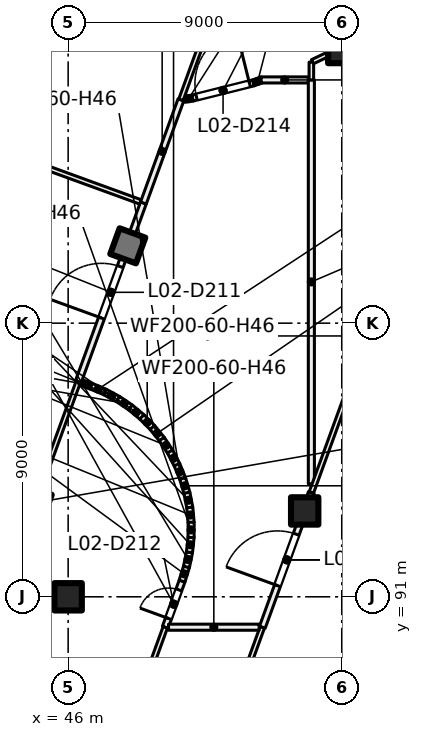
"""IFC4 building model, lengths in metres.
Left out: names, types, materials, properties, quantities, classifications, styles, units other than length and angle.
Written with IfcOpenShell. Run it as: python <this file> out.ifc"""

import sys

from ifc_helpers import new_model, si_unit, direction, frame, frame_2d, origin, origin_2d, place, context, subcontext, project, spatial, rectangle, extrude, element, fill, save


model = new_model("IFC4")
c1 = context("Model", 3, precision=1e-05, world=origin(), true_north=direction((0.0, 1.0)))
c2 = subcontext(c1, "Body", "Model", "MODEL_VIEW")
j1 = project(units=[si_unit("LENGTHUNIT", "METRE"), si_unit("PLANEANGLEUNIT", "RADIAN")], contexts=[c1])
p1 = place(None, origin())
s1 = spatial("IfcSite", under=j1, at=p1, CompositionType="ELEMENT")
p2 = place(p1, origin())
s2 = spatial("IfcBuilding", under=s1, at=p2, CompositionType="ELEMENT")
p3 = place(p2, frame((0.0, 0.0, 12.5)))
s3 = spatial("IfcBuildingStorey", under=s2, at=p3, CompositionType="ELEMENT", Elevation=12.5)
for number, where, z_axis, x_axis in (
    (1, (46.0, 91.0, 0.0), (0.0, 0.0, 1.0), (1.0, 0.0, 0.0)),
    (2, (55.0, 109.0, 0.0), (0.0, 0.0, 1.0), (1.0, 0.0, 0.0)),
    (3, (53.78, 93.824, 0.0), (0.0, 0.0, 1.0), (1.0, 0.0, 0.0)),
    (4, (47.962, 102.544, 0.0), (0.0, 0.0, 1.0), (-0.342, -0.94, 0.0)),
):
    element("IfcColumn", number, at=place(p3, frame(where, z_axis=z_axis, x_axis=x_axis)), inside=s3, PredefinedType="COLUMN", context=c2, shape_type="SweptSolid", body=[
        extrude(rectangle(XDim=0.9, YDim=0.9, at=origin_2d()), origin(), (0.0, 0.0, 1.0), 5.0),
    ])
p4 = place(p3, frame((91.159, 89.742, 0.0), z_axis=(0.0, 0.0, 1.0), x_axis=(-0.866704063601, -0.498822680055, 0.0)))
e5 = element("IfcWall", 5, at=p4, inside=s3, PredefinedType="SOLIDWALL", context=c2, shape_type="SweptSolid", body=[
    extrude(rectangle(XDim=44.487, YDim=0.6, at=frame_2d((22.244, 0.0))), origin(), (0.0, 0.0, 1.0), 4.6),
])
p5 = place(p4, frame((5.173, 0.0, 0.9)))
e6 = element("IfcOpeningElement", 6, at=p5, cuts=e5, PredefinedType="OPENING", context=c2, shape_type="SweptSolid", body=[
    extrude(rectangle(XDim=3.0, YDim=3.0, at=frame_2d((1.5, 1.5))), frame((0.0, 0.31, 0.0), z_axis=(0.0, -1.0, 0.0), x_axis=(1.0, 0.0, 0.0)), (0.0, 0.0, 1.0), 0.62),
])
p6 = place(p4, frame((14.071, 0.0, 0.9)))
e7 = element("IfcOpeningElement", 7, at=p6, cuts=e5, PredefinedType="OPENING", context=c2, shape_type="SweptSolid", body=[
    extrude(rectangle(XDim=3.0, YDim=3.0, at=frame_2d((1.5, 1.5))), frame((0.0, 0.31, 0.0), z_axis=(0.0, -1.0, 0.0), x_axis=(1.0, 0.0, 0.0)), (0.0, 0.0, 1.0), 0.62),
])
p7 = place(p4, frame((22.968, 0.0, 0.9)))
e8 = element("IfcOpeningElement", 8, at=p7, cuts=e5, PredefinedType="OPENING", context=c2, shape_type="SweptSolid", body=[
    extrude(rectangle(XDim=3.0, YDim=3.0, at=frame_2d((1.5, 1.5))), frame((0.0, 0.31, 0.0), z_axis=(0.0, -1.0, 0.0), x_axis=(1.0, 0.0, 0.0)), (0.0, 0.0, 1.0), 0.62),
])
p8 = place(p4, frame((31.865, 0.0, 0.9)))
e9 = element("IfcOpeningElement", 9, at=p8, cuts=e5, PredefinedType="OPENING", context=c2, shape_type="SweptSolid", body=[
    extrude(rectangle(XDim=3.0, YDim=3.0, at=frame_2d((1.5, 1.5))), frame((0.0, 0.31, 0.0), z_axis=(0.0, -1.0, 0.0), x_axis=(1.0, 0.0, 0.0)), (0.0, 0.0, 1.0), 0.62),
])
p9 = place(p4, frame((40.613, 0.0, 0.9)))
e10 = element("IfcOpeningElement", 10, at=p9, cuts=e5, PredefinedType="OPENING", context=c2, shape_type="SweptSolid", body=[
    extrude(rectangle(XDim=3.0, YDim=3.0, at=frame_2d((1.5, 1.5))), frame((0.0, 0.31, 0.0), z_axis=(0.0, -1.0, 0.0), x_axis=(1.0, 0.0, 0.0)), (0.0, 0.0, 1.0), 0.62),
])
p10 = place(p3, frame((40.44, 106.878, 0.0), z_axis=(0.0, 0.0, 1.0), x_axis=(0.939672748075, -0.342074738216, 0.0)))
e11 = element("IfcWall", 11, at=p10, inside=s3, PredefinedType="PARTITIONING", context=c2, shape_type="SweptSolid", body=[
    extrude(rectangle(XDim=8.451, YDim=0.15, at=frame_2d((4.226, 0.0))), origin(), (0.0, 0.0, 1.0), 4.6),
])
p11 = place(p3, frame((49.196, 90.0, 0.0), z_axis=(0.0, 0.0, 1.0), x_axis=(-0.342037332118, -0.939686364399, 0.0)))
e12 = element("IfcWall", 12, at=p11, inside=s3, PredefinedType="PARTITIONING", context=c2, shape_type="SweptSolid", body=[
    extrude(rectangle(XDim=15.387, YDim=0.15, at=frame_2d((7.693, 0.0))), origin(), (0.0, 0.0, 1.0), 4.6),
])
p12 = place(p11, frame((6.99, 0.0, 0.0)))
e13 = element("IfcOpeningElement", 13, at=p12, cuts=e12, PredefinedType="OPENING", context=c2, shape_type="SweptSolid", body=[
    extrude(rectangle(XDim=1.0, YDim=2.1, at=frame_2d((0.5, 1.05))), frame((0.0, 0.085, 0.0), z_axis=(0.0, -1.0, 0.0), x_axis=(1.0, 0.0, 0.0)), (0.0, 0.0, 1.0), 0.17),
])
p13 = place(p3, frame((44.627, 93.382, 0.0), z_axis=(0.0, 0.0, 1.0), x_axis=(0.342025351501, 0.939690725149, 0.0)))
e14 = element("IfcWall", 14, at=p13, inside=s3, PredefinedType="PARTITIONING", context=c2, shape_type="SweptSolid", body=[
    extrude(rectangle(XDim=5.0, YDim=0.15, at=frame_2d((2.5, 0.0))), origin(), (0.0, 0.0, 1.0), 4.6),
])
p14 = place(p3, frame((46.431, 98.046, 0.0), z_axis=(0.0, 0.0, 1.0), x_axis=(0.939367946247, -0.342910865334, 0.0)))
e15 = element("IfcWall", 15, at=p14, inside=s3, PredefinedType="PARTITIONING", context=c2, shape_type="SweptSolid", body=[
    extrude(rectangle(XDim=0.353, YDim=0.2, at=frame_2d((0.176, 0.0))), origin(), (0.0, 0.0, 1.0), 4.6),
])
p15 = place(p3, frame((46.337, 98.08, 0.0), z_axis=(0.0, 0.0, 1.0), x_axis=(0.342113136459, 0.939658768842, 0.0)))
e16 = element("IfcWall", 16, at=p15, inside=s3, PredefinedType="PARTITIONING", context=c2, shape_type="SweptSolid", body=[
    extrude(rectangle(XDim=6.25, YDim=0.2, at=frame_2d((3.125, 0.0))), origin(), (0.0, 0.0, 1.0), 4.6),
])
p16 = place(p15, frame((2.223, 0.0, 0.0)))
e17 = element("IfcOpeningElement", 17, at=p16, cuts=e16, PredefinedType="OPENING", context=c2, shape_type="SweptSolid", body=[
    extrude(rectangle(XDim=1.8, YDim=2.1, at=frame_2d((0.9, 1.05))), frame((0.0, 0.11, 0.0), z_axis=(0.0, -1.0, 0.0), x_axis=(1.0, 0.0, 0.0)), (0.0, 0.0, 1.0), 0.22),
])
p17 = place(p3, frame((46.758, 97.927, 0.0), z_axis=(0.0, 0.0, 1.0), x_axis=(0.921736861553, -0.387815881643, 0.0)))
e18 = element("IfcWall", 18, at=p17, inside=s3, PredefinedType="PARTITIONING", context=c2, shape_type="SweptSolid", body=[
    extrude(rectangle(XDim=0.498, YDim=0.2, at=frame_2d((0.249, 0.0))), origin(), (0.0, 0.0, 1.0), 4.6),
])
p18 = place(p3, frame((47.208, 97.738, 0.0), z_axis=(0.0, 0.0, 1.0), x_axis=(0.879513307417, -0.475874292304, 0.0)))
e19 = element("IfcWall", 19, at=p18, inside=s3, PredefinedType="PARTITIONING", context=c2, shape_type="SweptSolid", body=[
    extrude(rectangle(XDim=0.5, YDim=0.2, at=frame_2d((0.25, 0.0))), origin(), (0.0, 0.0, 1.0), 4.6),
])
p19 = place(p3, frame((47.608, 76.866, 0.0), z_axis=(0.0, 0.0, 1.0), x_axis=(0.341996903655, 0.939701079009, 0.0)))
e20 = element("IfcWall", 20, at=p19, inside=s3, PredefinedType="PARTITIONING", context=c2, shape_type="SweptSolid", body=[
    extrude(rectangle(XDim=13.977, YDim=0.15, at=frame_2d((6.988, 0.0))), origin(), (0.0, 0.0, 1.0), 4.6),
])
p20 = place(p3, frame((47.64, 97.505, 0.0), z_axis=(0.0, 0.0, 1.0), x_axis=(0.828576718052, -0.559875541797, 0.0)))
e21 = element("IfcWall", 21, at=p20, inside=s3, PredefinedType="PARTITIONING", context=c2, shape_type="SweptSolid", body=[
    extrude(rectangle(XDim=0.5, YDim=0.2, at=frame_2d((0.25, 0.0))), origin(), (0.0, 0.0, 1.0), 4.6),
])
p21 = place(p3, frame((48.046, 97.231, 0.0), z_axis=(0.0, 0.0, 1.0), x_axis=(0.769775465544, -0.638314759853, 0.0)))
e22 = element("IfcWall", 22, at=p21, inside=s3, PredefinedType="PARTITIONING", context=c2, shape_type="SweptSolid", body=[
    extrude(rectangle(XDim=0.501, YDim=0.2, at=frame_2d((0.251, 0.0))), origin(), (0.0, 0.0, 1.0), 4.6),
])
p22 = place(p3, frame((48.425, 96.917, 0.0), z_axis=(0.0, 0.0, 1.0), x_axis=(0.702936615275, -0.711252497293, 0.0)))
e23 = element("IfcWall", 23, at=p22, inside=s3, PredefinedType="PARTITIONING", context=c2, shape_type="SweptSolid", body=[
    extrude(rectangle(XDim=0.499, YDim=0.2, at=frame_2d((0.25, 0.0))), origin(), (0.0, 0.0, 1.0), 4.6),
])
p23 = place(p3, frame((48.475, 103.953, 0.0), z_axis=(0.0, 0.0, 1.0), x_axis=(0.341992779494, 0.939702579955, 0.0)))
e24 = element("IfcWall", 24, at=p23, inside=s3, PredefinedType="PARTITIONING", context=c2, shape_type="SweptSolid", body=[
    extrude(rectangle(XDim=3.611, YDim=0.2, at=frame_2d((1.805, 0.0))), origin(), (0.0, 0.0, 1.0), 4.6),
])
p24 = place(p3, frame((48.77, 96.569, 0.0), z_axis=(0.0, 0.0, 1.0), x_axis=(0.629085992687, -0.777335714994, 0.0)))
e25 = element("IfcWall", 25, at=p24, inside=s3, PredefinedType="PARTITIONING", context=c2, shape_type="SweptSolid", body=[
    extrude(rectangle(XDim=0.501, YDim=0.2, at=frame_2d((0.25, 0.0))), origin(), (0.0, 0.0, 1.0), 4.6),
])
p25 = place(p3, frame((49.079, 96.188, 0.0), z_axis=(0.0, 0.0, 1.0), x_axis=(0.553123351367, -0.833099368726, 0.0)))
e26 = element("IfcWall", 26, at=p25, inside=s3, PredefinedType="PARTITIONING", context=c2, shape_type="SweptSolid", body=[
    extrude(rectangle(XDim=0.5, YDim=0.2, at=frame_2d((0.25, 0.0))), origin(), (0.0, 0.0, 1.0), 4.6),
])
p26 = place(p3, frame((49.196, 90.0, 0.0), z_axis=(0.0, 0.0, 1.0), x_axis=(0.341876370555, 0.93974493734, 0.0)))
e27 = element("IfcWall", 27, at=p26, inside=s3, PredefinedType="PARTITIONING", context=c2, shape_type="SweptSolid", body=[
    extrude(rectangle(XDim=1.617, YDim=0.2, at=frame_2d((0.809, 0.0))), origin(), (0.0, 0.0, 1.0), 4.6),
])
p27 = place(p26, frame((0.306, 0.0, 0.0)))
e28 = element("IfcOpeningElement", 28, at=p27, cuts=e27, PredefinedType="OPENING", context=c2, shape_type="SweptSolid", body=[
    extrude(rectangle(XDim=1.0, YDim=2.1, at=frame_2d((0.5, 1.05))), frame((0.0, 0.11, 0.0), z_axis=(0.0, -1.0, 0.0), x_axis=(1.0, 0.0, 0.0)), (0.0, 0.0, 1.0), 0.22),
])
p28 = place(p3, frame((49.302, 90.0, 0.0), z_axis=(0.0, 0.0, 1.0), x_axis=(1.0, 0.0, 0.0)))
e29 = element("IfcWall", 29, at=p28, inside=s3, PredefinedType="PARTITIONING", context=c2, shape_type="SweptSolid", body=[
    extrude(rectangle(XDim=2.98, YDim=0.2, at=frame_2d((1.49, 0.0))), origin(), (0.0, 0.0, 1.0), 4.6),
])
p29 = place(p3, frame((49.351, 95.779, 0.0), z_axis=(0.0, 0.0, 1.0), x_axis=(0.464536791609, -0.885553820635, 0.0)))
e30 = element("IfcWall", 30, at=p29, inside=s3, PredefinedType="PARTITIONING", context=c2, shape_type="SweptSolid", body=[
    extrude(rectangle(XDim=0.499, YDim=0.2, at=frame_2d((0.25, 0.0))), origin(), (0.0, 0.0, 1.0), 4.6),
])
p30 = place(p3, frame((49.579, 95.345, 0.0), z_axis=(0.0, 0.0, 1.0), x_axis=(0.379620609111, -0.925142255622, 0.0)))
e31 = element("IfcWall", 31, at=p30, inside=s3, PredefinedType="PARTITIONING", context=c2, shape_type="SweptSolid", body=[
    extrude(rectangle(XDim=0.5, YDim=0.2, at=frame_2d((0.25, 0.0))), origin(), (0.0, 0.0, 1.0), 4.6),
])
p31 = place(p3, frame((49.823, 107.363, 0.0), z_axis=(0.0, 0.0, 1.0), x_axis=(0.988866439098, 0.148805798359, 0.0)))
e32 = element("IfcWall", 32, at=p31, inside=s3, PredefinedType="PARTITIONING", context=c2, shape_type="SweptSolid", body=[
    extrude(rectangle(XDim=0.282, YDim=0.2, at=frame_2d((0.141, 0.0))), origin(), (0.0, 0.0, 1.0), 4.6),
])
p32 = place(p3, frame((49.71, 107.346, 0.0), z_axis=(0.0, 0.0, 1.0), x_axis=(0.341943087223, 0.939720663336, 0.0)))
e33 = element("IfcWall", 33, at=p32, inside=s3, PredefinedType="PARTITIONING", context=c2, shape_type="SweptSolid", body=[
    extrude(rectangle(XDim=5.39, YDim=0.15, at=frame_2d((2.695, 0.0))), origin(), (0.0, 0.0, 1.0), 4.6),
])
p33 = place(p3, frame((49.747, 91.516, 0.0), z_axis=(0.0, 0.0, 1.0), x_axis=(0.29511913713, 0.955460462238, 0.0)))
e34 = element("IfcWall", 34, at=p33, inside=s3, PredefinedType="PARTITIONING", context=c2, shape_type="SweptSolid", body=[
    extrude(rectangle(XDim=0.498, YDim=0.2, at=frame_2d((0.249, 0.0))), origin(), (0.0, 0.0, 1.0), 4.6),
])
p34 = place(p3, frame((49.766, 94.892, 0.0), z_axis=(0.0, 0.0, 1.0), x_axis=(0.282745917583, -0.95919484261, 0.0)))
e35 = element("IfcWall", 35, at=p34, inside=s3, PredefinedType="PARTITIONING", context=c2, shape_type="SweptSolid", body=[
    extrude(rectangle(XDim=0.502, YDim=0.2, at=frame_2d((0.251, 0.0))), origin(), (0.0, 0.0, 1.0), 4.6),
])
p35 = place(p3, frame((49.892, 91.982, 0.0), z_axis=(0.0, 0.0, 1.0), x_axis=(0.20155652864, 0.979476883731, 0.0)))
e36 = element("IfcWall", 36, at=p35, inside=s3, PredefinedType="PARTITIONING", context=c2, shape_type="SweptSolid", body=[
    extrude(rectangle(XDim=0.5, YDim=0.2, at=frame_2d((0.25, 0.0))), origin(), (0.0, 0.0, 1.0), 4.6),
])
p36 = place(p3, frame((49.906, 94.421, 0.0), z_axis=(0.0, 0.0, 1.0), x_axis=(0.189915644008, -0.981800411571, 0.0)))
e37 = element("IfcWall", 37, at=p36, inside=s3, PredefinedType="PARTITIONING", context=c2, shape_type="SweptSolid", body=[
    extrude(rectangle(XDim=0.5, YDim=0.2, at=frame_2d((0.25, 0.0))), origin(), (0.0, 0.0, 1.0), 4.6),
])
for number, where, z_axis, x_axis in (
    (38, (49.991, 92.462, 0.0), (0.0, 0.0, 1.0), (0.106, 0.994, 0.0)),
    (39, (50.0, 93.94, 0.0), (0.0, 0.0, 1.0), (0.09, -0.996, 0.0)),
    (40, (50.043, 92.95, 0.0), (0.0, 0.0, 1.0), (0.004, 1.0, 0.0)),
):
    element("IfcWall", number, at=place(p3, frame(where, z_axis=z_axis, x_axis=x_axis)), inside=s3, PredefinedType="PARTITIONING", context=c2, shape_type="SweptSolid", body=[
        extrude(rectangle(XDim=0.501, YDim=0.2, at=frame_2d((0.25, 0.0))), origin(), (0.0, 0.0, 1.0), 4.6),
    ])
p37 = place(p3, frame((52.101, 107.905, 0.0), z_axis=(0.0, 0.0, 1.0), x_axis=(-0.970177165917, -0.242396919811, 0.0)))
e41 = element("IfcWall", 41, at=p37, inside=s3, PredefinedType="PARTITIONING", context=c2, shape_type="SweptSolid", body=[
    extrude(rectangle(XDim=2.071, YDim=0.2, at=frame_2d((1.035, 0.0))), origin(), (0.0, 0.0, 1.0), 4.6),
])
p38 = place(p37, frame((0.136, 0.0, 0.0)))
e42 = element("IfcOpeningElement", 42, at=p38, cuts=e41, PredefinedType="OPENING", context=c2, shape_type="SweptSolid", body=[
    extrude(rectangle(XDim=1.8, YDim=2.1, at=frame_2d((0.9, 1.05))), frame((0.0, 0.11, 0.0), z_axis=(0.0, -1.0, 0.0), x_axis=(1.0, 0.0, 0.0)), (0.0, 0.0, 1.0), 0.22),
])
p39 = place(p3, frame((52.091, 107.902, 0.0), z_axis=(0.0, 0.0, 1.0), x_axis=(0.940856992367, 0.338803954986, 0.0)))
e43 = element("IfcWall", 43, at=p39, inside=s3, PredefinedType="PARTITIONING", context=c2, shape_type="SweptSolid", body=[
    extrude(rectangle(XDim=0.307, YDim=0.2, at=frame_2d((0.153, 0.0))), origin(), (0.0, 0.0, 1.0), 4.6),
])
p40 = place(p3, frame((52.347, 108.0, 0.0), z_axis=(0.0, 0.0, 1.0), x_axis=(1.0, 0.0, 0.0)))
e44 = element("IfcWall", 44, at=p40, inside=s3, PredefinedType="PARTITIONING", context=c2, shape_type="SweptSolid", body=[
    extrude(rectangle(XDim=1.553, YDim=0.2, at=frame_2d((0.776, 0.0))), origin(), (0.0, 0.0, 1.0), 4.6),
])
p41 = place(p3, frame((52.388, 90.0, 0.0), z_axis=(0.0, 0.0, 1.0), x_axis=(0.342096627731, 0.939664779214, 0.0)))
e45 = element("IfcWall", 45, at=p41, inside=s3, PredefinedType="PARTITIONING", context=c2, shape_type="SweptSolid", body=[
    extrude(rectangle(XDim=4.712, YDim=0.2, at=frame_2d((2.356, 0.0))), origin(), (0.0, 0.0, 1.0), 4.6),
])
p42 = place(p41, frame((1.456, 0.0, 0.0)))
e46 = element("IfcOpeningElement", 46, at=p42, cuts=e45, PredefinedType="OPENING", context=c2, shape_type="SweptSolid", body=[
    extrude(rectangle(XDim=1.8, YDim=2.1, at=frame_2d((0.9, 1.05))), frame((0.0, 0.11, 0.0), z_axis=(0.0, -1.0, 0.0), x_axis=(1.0, 0.0, 0.0)), (0.0, 0.0, 1.0), 0.22),
])
p43 = place(p3, frame((53.348, 75.152, 0.0), z_axis=(0.0, 0.0, 1.0), x_axis=(0.342006895874, 0.939697442358, 0.0)))
e47 = element("IfcWall", 47, at=p43, inside=s3, PredefinedType="PARTITIONING", context=c2, shape_type="SweptSolid", body=[
    extrude(rectangle(XDim=29.792, YDim=0.3, at=frame_2d((14.896, 0.0))), origin(), (0.0, 0.0, 1.0), 6.1),
])
p44 = place(p3, frame((101.764, 103.0, 0.0), z_axis=(0.0, 0.0, 1.0), x_axis=(-0.866697259032, -0.498834502802, 0.0)))
e48 = element("IfcWall", 48, at=p44, inside=s3, PredefinedType="PARTITIONING", context=c2, shape_type="SweptSolid", body=[
    extrude(rectangle(XDim=55.547, YDim=0.3, at=frame_2d((27.774, 0.0))), origin(), (0.0, 0.0, 1.0), 6.1),
])
p45 = place(p44, frame((43.673, 0.0, 0.0)))
e49 = element("IfcOpeningElement", 49, at=p45, cuts=e48, PredefinedType="OPENING", context=c2, shape_type="SweptSolid", body=[
    extrude(rectangle(XDim=2.0, YDim=2.1, at=frame_2d((1.0, 1.05))), frame((0.0, 0.16, 0.0), z_axis=(0.0, -1.0, 0.0), x_axis=(1.0, 0.0, 0.0)), (0.0, 0.0, 1.0), 0.32),
])
p46 = place(p44, frame((26.921, 0.0, 0.0)))
e50 = element("IfcOpeningElement", 50, at=p46, cuts=e48, PredefinedType="OPENING", context=c2, shape_type="SweptSolid", body=[
    extrude(rectangle(XDim=2.0, YDim=2.1, at=frame_2d((1.0, 1.05))), frame((0.0, 0.16, 0.0), z_axis=(0.0, -1.0, 0.0), x_axis=(1.0, 0.0, 0.0)), (0.0, 0.0, 1.0), 0.32),
])
p47 = place(p44, frame((10.169, 0.0, 0.0)))
e51 = element("IfcOpeningElement", 51, at=p47, cuts=e48, PredefinedType="OPENING", context=c2, shape_type="SweptSolid", body=[
    extrude(rectangle(XDim=2.0, YDim=2.1, at=frame_2d((1.0, 1.05))), frame((0.0, 0.16, 0.0), z_axis=(0.0, -1.0, 0.0), x_axis=(1.0, 0.0, 0.0)), (0.0, 0.0, 1.0), 0.32),
])
p48 = place(p3, frame((54.0, 94.715, 0.0), z_axis=(0.0, 0.0, 1.0), x_axis=(0.0, 1.0, 0.0)))
e52 = element("IfcWall", 52, at=p48, inside=s3, PredefinedType="PARTITIONING", context=c2, shape_type="SweptSolid", body=[
    extrude(rectangle(XDim=13.285, YDim=0.2, at=frame_2d((6.643, 0.0))), origin(), (0.0, 0.0, 1.0), 4.6),
])
p49 = place(p3, frame((54.0, 94.429, 0.0), z_axis=(0.0, 0.0, 1.0), x_axis=(0.342085241875, 0.939668924298, 0.0)))
e53 = element("IfcWall", 53, at=p49, inside=s3, PredefinedType="PARTITIONING", context=c2, shape_type="SweptSolid", body=[
    extrude(rectangle(XDim=15.581, YDim=0.15, at=frame_2d((7.791, 0.0))), origin(), (0.0, 0.0, 1.0), 4.6),
])
p50 = place(p3, frame((54.0, 108.0, 0.0), z_axis=(0.0, 0.0, 1.0), x_axis=(0.0, 1.0, 0.0)))
e54 = element("IfcWall", 54, at=p50, inside=s3, PredefinedType="PARTITIONING", context=c2, shape_type="SweptSolid", body=[
    extrude(rectangle(XDim=0.586, YDim=0.15, at=frame_2d((0.293, 0.0))), origin(), (0.0, 0.0, 1.0), 4.6),
])
p51 = place(p3, frame((54.036, 108.599, 0.0), z_axis=(0.0, 0.0, 1.0), x_axis=(0.903959249768, 0.427618608995, 0.0)))
e55 = element("IfcWall", 55, at=p51, inside=s3, PredefinedType="PARTITIONING", context=c2, shape_type="SweptSolid", body=[
    extrude(rectangle(XDim=2.064, YDim=0.15, at=frame_2d((1.032, 0.0))), origin(), (0.0, 0.0, 1.0), 4.6),
])
p52 = place(p16, origin())
e56 = element("IfcDoor", 56, at=p52, inside=s3, OperationType="DOUBLE_DOOR_SINGLE_SWING", PredefinedType="DOOR", context=c2, shape_type="SweptSolid", body=[
    extrude(rectangle(XDim=1.8, YDim=2.1, at=frame_2d((0.9, 1.05))), frame((0.0, 0.025, 0.0), z_axis=(0.0, -1.0, 0.0), x_axis=(1.0, 0.0, 0.0)), (0.0, 0.0, 1.0), 0.05),
])
fill(e17, e56)
p53 = place(p27, origin())
e57 = element("IfcDoor", 57, at=p53, inside=s3, OperationType="SINGLE_SWING_LEFT", PredefinedType="DOOR", context=c2, shape_type="SweptSolid", body=[
    extrude(rectangle(XDim=1.0, YDim=2.1, at=frame_2d((0.5, 1.05))), frame((0.0, 0.025, 0.0), z_axis=(0.0, -1.0, 0.0), x_axis=(1.0, 0.0, 0.0)), (0.0, 0.0, 1.0), 0.05),
])
fill(e28, e57)
p54 = place(p38, origin())
e58 = element("IfcDoor", 58, at=p54, inside=s3, OperationType="DOUBLE_DOOR_SINGLE_SWING", PredefinedType="DOOR", context=c2, shape_type="SweptSolid", body=[
    extrude(rectangle(XDim=1.8, YDim=2.1, at=frame_2d((0.9, 1.05))), frame((0.0, 0.025, 0.0), z_axis=(0.0, -1.0, 0.0), x_axis=(1.0, 0.0, 0.0)), (0.0, 0.0, 1.0), 0.05),
])
fill(e42, e58)
p55 = place(p42, origin())
e59 = element("IfcDoor", 59, at=p55, inside=s3, OperationType="DOUBLE_DOOR_SINGLE_SWING", PredefinedType="DOOR", context=c2, shape_type="SweptSolid", body=[
    extrude(rectangle(XDim=1.8, YDim=2.1, at=frame_2d((0.9, 1.05))), frame((0.0, 0.025, 0.0), z_axis=(0.0, -1.0, 0.0), x_axis=(1.0, 0.0, 0.0)), (0.0, 0.0, 1.0), 0.05),
])
fill(e46, e59)
save(model, sys.argv[1])
